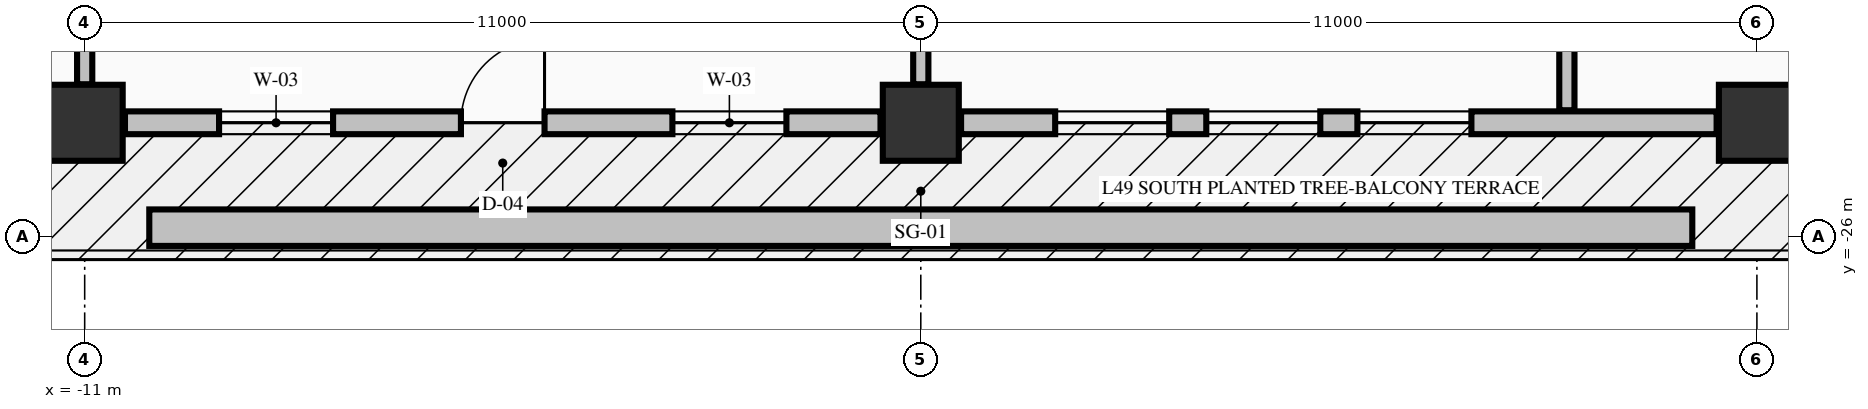
"""IFC4 building model, lengths in metres.
Left out: names, types, materials, properties, quantities, classifications, styles, units other than length and angle.
Written with IfcOpenShell. Run it as: python <this file> out.ifc"""

import sys

from ifc_helpers import new_model, si_unit, direction, frame, frame_2d, origin, origin_2d, place, context, subcontext, project, spatial, rectangle, extrude, element, fill, save


model = new_model("IFC4")
c1 = context("Model", 3, precision=1e-05, world=origin(), true_north=direction((0.0, 1.0)))
c2 = subcontext(c1, "Body", "Model", "MODEL_VIEW")
j1 = project(units=[si_unit("LENGTHUNIT", "METRE"), si_unit("PLANEANGLEUNIT", "RADIAN")], contexts=[c1])
p1 = place(None, origin())
s1 = spatial("IfcSite", under=j1, at=p1, CompositionType="ELEMENT")
p2 = place(p1, origin())
s2 = spatial("IfcBuilding", under=s1, at=p2, CompositionType="ELEMENT")
p3 = place(p2, frame((0.0, 0.0, 191.46)))
s3 = spatial("IfcBuildingStorey", under=s2, at=p3, CompositionType="ELEMENT", Elevation=191.46)
for number, where, z_axis, x_axis in (
    (1, (-11.0, -24.5, -0.425), (0.0, 0.0, 1.0), (1.0, 0.0, 0.0)),
    (2, (0.0, -24.5, -0.425), (0.0, 0.0, 1.0), (1.0, 0.0, 0.0)),
    (3, (11.0, -24.5, -0.425), (0.0, 0.0, 1.0), (1.0, 0.0, 0.0)),
):
    element("IfcColumn", number, at=place(p3, frame(where, z_axis=z_axis, x_axis=x_axis)), inside=s3, PredefinedType="COLUMN", context=c2, shape_type="SweptSolid", body=[
        extrude(rectangle(XDim=1.0, YDim=1.0, at=origin_2d()), origin(), (0.0, 0.0, 1.0), 3.55),
    ])
p4 = place(p3, frame((-10.47, -24.5, 0.0), z_axis=(0.0, 0.0, 1.0), x_axis=(1.0, 0.0, 0.0)))
e4 = element("IfcWall", 4, at=p4, inside=s3, PredefinedType="STANDARD", context=c2, shape_type="SweptSolid", body=[
    extrude(rectangle(XDim=9.94, YDim=0.3, at=frame_2d((4.97, 0.0))), origin(), (0.0, 0.0, 1.0), 2.517),
])
p5 = place(p4, frame((4.42, 0.0, 0.0)))
e5 = element("IfcOpeningElement", 5, at=p5, cuts=e4, PredefinedType="OPENING", context=c2, shape_type="SweptSolid", body=[
    extrude(rectangle(XDim=1.1, YDim=2.15, at=frame_2d((0.55, 1.075))), frame((0.0, 0.16, 0.0), z_axis=(0.0, -1.0, 0.0), x_axis=(1.0, 0.0, 0.0)), (0.0, 0.0, 1.0), 0.32),
])
p6 = place(p4, frame((1.238, 0.0, 0.72)))
e6 = element("IfcOpeningElement", 6, at=p6, cuts=e4, PredefinedType="OPENING", context=c2, shape_type="SweptSolid", body=[
    extrude(rectangle(XDim=1.5, YDim=1.6, at=frame_2d((0.75, 0.8))), frame((0.0, 0.16, 0.0), z_axis=(0.0, -1.0, 0.0), x_axis=(1.0, 0.0, 0.0)), (0.0, 0.0, 1.0), 0.32),
])
p7 = place(p4, frame((7.202, 0.0, 0.72)))
e7 = element("IfcOpeningElement", 7, at=p7, cuts=e4, PredefinedType="OPENING", context=c2, shape_type="SweptSolid", body=[
    extrude(rectangle(XDim=1.5, YDim=1.6, at=frame_2d((0.75, 0.8))), frame((0.0, 0.16, 0.0), z_axis=(0.0, -1.0, 0.0), x_axis=(1.0, 0.0, 0.0)), (0.0, 0.0, 1.0), 0.32),
])
p8 = place(p3, frame((0.53, -24.5, 0.0), z_axis=(0.0, 0.0, 1.0), x_axis=(1.0, 0.0, 0.0)))
e8 = element("IfcWall", 8, at=p8, inside=s3, PredefinedType="STANDARD", context=c2, shape_type="SweptSolid", body=[
    extrude(rectangle(XDim=9.94, YDim=0.3, at=frame_2d((4.97, 0.0))), origin(), (0.0, 0.0, 1.0), 2.517),
])
p9 = place(p8, frame((1.238, 0.0, 0.72)))
e9 = element("IfcOpeningElement", 9, at=p9, cuts=e8, PredefinedType="OPENING", context=c2, shape_type="SweptSolid", body=[
    extrude(rectangle(XDim=1.5, YDim=1.6, at=frame_2d((0.75, 0.8))), frame((0.0, 0.16, 0.0), z_axis=(0.0, -1.0, 0.0), x_axis=(1.0, 0.0, 0.0)), (0.0, 0.0, 1.0), 0.32),
])
p10 = place(p8, frame((3.226, 0.0, 0.72)))
e10 = element("IfcOpeningElement", 10, at=p10, cuts=e8, PredefinedType="OPENING", context=c2, shape_type="SweptSolid", body=[
    extrude(rectangle(XDim=1.5, YDim=1.6, at=frame_2d((0.75, 0.8))), frame((0.0, 0.16, 0.0), z_axis=(0.0, -1.0, 0.0), x_axis=(1.0, 0.0, 0.0)), (0.0, 0.0, 1.0), 0.32),
])
p11 = place(p8, frame((5.214, 0.0, 0.72)))
e11 = element("IfcOpeningElement", 11, at=p11, cuts=e8, PredefinedType="OPENING", context=c2, shape_type="SweptSolid", body=[
    extrude(rectangle(XDim=1.5, YDim=1.6, at=frame_2d((0.75, 0.8))), frame((0.0, 0.16, 0.0), z_axis=(0.0, -1.0, 0.0), x_axis=(1.0, 0.0, 0.0)), (0.0, 0.0, 1.0), 0.32),
])
p12 = place(p3, frame((-11.0, -23.994, 0.0), z_axis=(0.0, 0.0, 1.0), x_axis=(0.0, 1.0, 0.0)))
e12 = element("IfcWall", 12, at=p12, inside=s3, PredefinedType="PARTITIONING", context=c2, shape_type="SweptSolid", body=[
    extrude(rectangle(XDim=9.116, YDim=0.2, at=frame_2d((4.558, 0.0))), origin(), (0.0, 0.0, 1.0), 2.317),
])
p13 = place(p3, frame((0.0, -23.994, 0.0), z_axis=(0.0, 0.0, 1.0), x_axis=(0.0, 1.0, 0.0)))
e13 = element("IfcWall", 13, at=p13, inside=s3, PredefinedType="PARTITIONING", context=c2, shape_type="SweptSolid", body=[
    extrude(rectangle(XDim=8.416, YDim=0.2, at=frame_2d((4.208, 0.0))), origin(), (0.0, 0.0, 1.0), 2.317),
])
p14 = place(p3, frame((8.5, -24.335, 0.0), z_axis=(0.0, 0.0, 1.0), x_axis=(0.0, 1.0, 0.0)))
e14 = element("IfcWall", 14, at=p14, inside=s3, PredefinedType="PARTITIONING", context=c2, shape_type="SweptSolid", body=[
    extrude(rectangle(XDim=9.457, YDim=0.2, at=frame_2d((4.729, 0.0))), origin(), (0.0, 0.0, 1.0), 3.125),
])
p15 = place(p3, frame((-10.15, -25.88, -0.04), z_axis=(0.0, 0.0, 1.0), x_axis=(1.0, 0.0, 0.0)))
e15 = element("IfcWall", 15, at=p15, inside=s3, PredefinedType="PARAPET", context=c2, shape_type="SweptSolid", body=[
    extrude(rectangle(XDim=20.3, YDim=0.48, at=frame_2d((10.15, 0.0))), origin(), (0.0, 0.0, 1.0), 0.52),
])
p16 = place(p5, origin())
e16 = element("IfcDoor", 16, at=p16, inside=s3, OperationType="SINGLE_SWING_RIGHT", PredefinedType="DOOR", context=c2, shape_type="SweptSolid", body=[
    extrude(rectangle(XDim=1.1, YDim=2.15, at=frame_2d((0.55, 1.075))), frame((0.0, 0.025, 0.0), z_axis=(0.0, -1.0, 0.0), x_axis=(1.0, 0.0, 0.0)), (0.0, 0.0, 1.0), 0.05),
])
fill(e5, e16)
p17 = place(p6, origin())
e17 = element("IfcWindow", 17, at=p17, inside=s3, PartitioningType="SINGLE_PANEL", PredefinedType="WINDOW", context=c2, shape_type="SweptSolid", body=[
    extrude(rectangle(XDim=1.5, YDim=1.6, at=frame_2d((0.75, 0.8))), frame((0.0, 0.03, 0.0), z_axis=(0.0, -1.0, 0.0), x_axis=(1.0, 0.0, 0.0)), (0.0, 0.0, 1.0), 0.06),
])
fill(e6, e17)
p18 = place(p7, origin())
e18 = element("IfcWindow", 18, at=p18, inside=s3, PartitioningType="SINGLE_PANEL", PredefinedType="WINDOW", context=c2, shape_type="SweptSolid", body=[
    extrude(rectangle(XDim=1.5, YDim=1.6, at=frame_2d((0.75, 0.8))), frame((0.0, 0.03, 0.0), z_axis=(0.0, -1.0, 0.0), x_axis=(1.0, 0.0, 0.0)), (0.0, 0.0, 1.0), 0.06),
])
fill(e7, e18)
p19 = place(p9, origin())
e19 = element("IfcWindow", 19, at=p19, inside=s3, PartitioningType="SINGLE_PANEL", PredefinedType="WINDOW", context=c2, shape_type="SweptSolid", body=[
    extrude(rectangle(XDim=1.5, YDim=1.6, at=frame_2d((0.75, 0.8))), frame((0.0, 0.03, 0.0), z_axis=(0.0, -1.0, 0.0), x_axis=(1.0, 0.0, 0.0)), (0.0, 0.0, 1.0), 0.06),
])
fill(e9, e19)
p20 = place(p10, origin())
e20 = element("IfcWindow", 20, at=p20, inside=s3, PartitioningType="SINGLE_PANEL", PredefinedType="WINDOW", context=c2, shape_type="SweptSolid", body=[
    extrude(rectangle(XDim=1.5, YDim=1.6, at=frame_2d((0.75, 0.8))), frame((0.0, 0.03, 0.0), z_axis=(0.0, -1.0, 0.0), x_axis=(1.0, 0.0, 0.0)), (0.0, 0.0, 1.0), 0.06),
])
fill(e10, e20)
p21 = place(p11, origin())
e21 = element("IfcWindow", 21, at=p21, inside=s3, PartitioningType="SINGLE_PANEL", PredefinedType="WINDOW", context=c2, shape_type="SweptSolid", body=[
    extrude(rectangle(XDim=1.5, YDim=1.6, at=frame_2d((0.75, 0.8))), frame((0.0, 0.03, 0.0), z_axis=(0.0, -1.0, 0.0), x_axis=(1.0, 0.0, 0.0)), (0.0, 0.0, 1.0), 0.06),
])
fill(e11, e21)
save(model, sys.argv[1])
